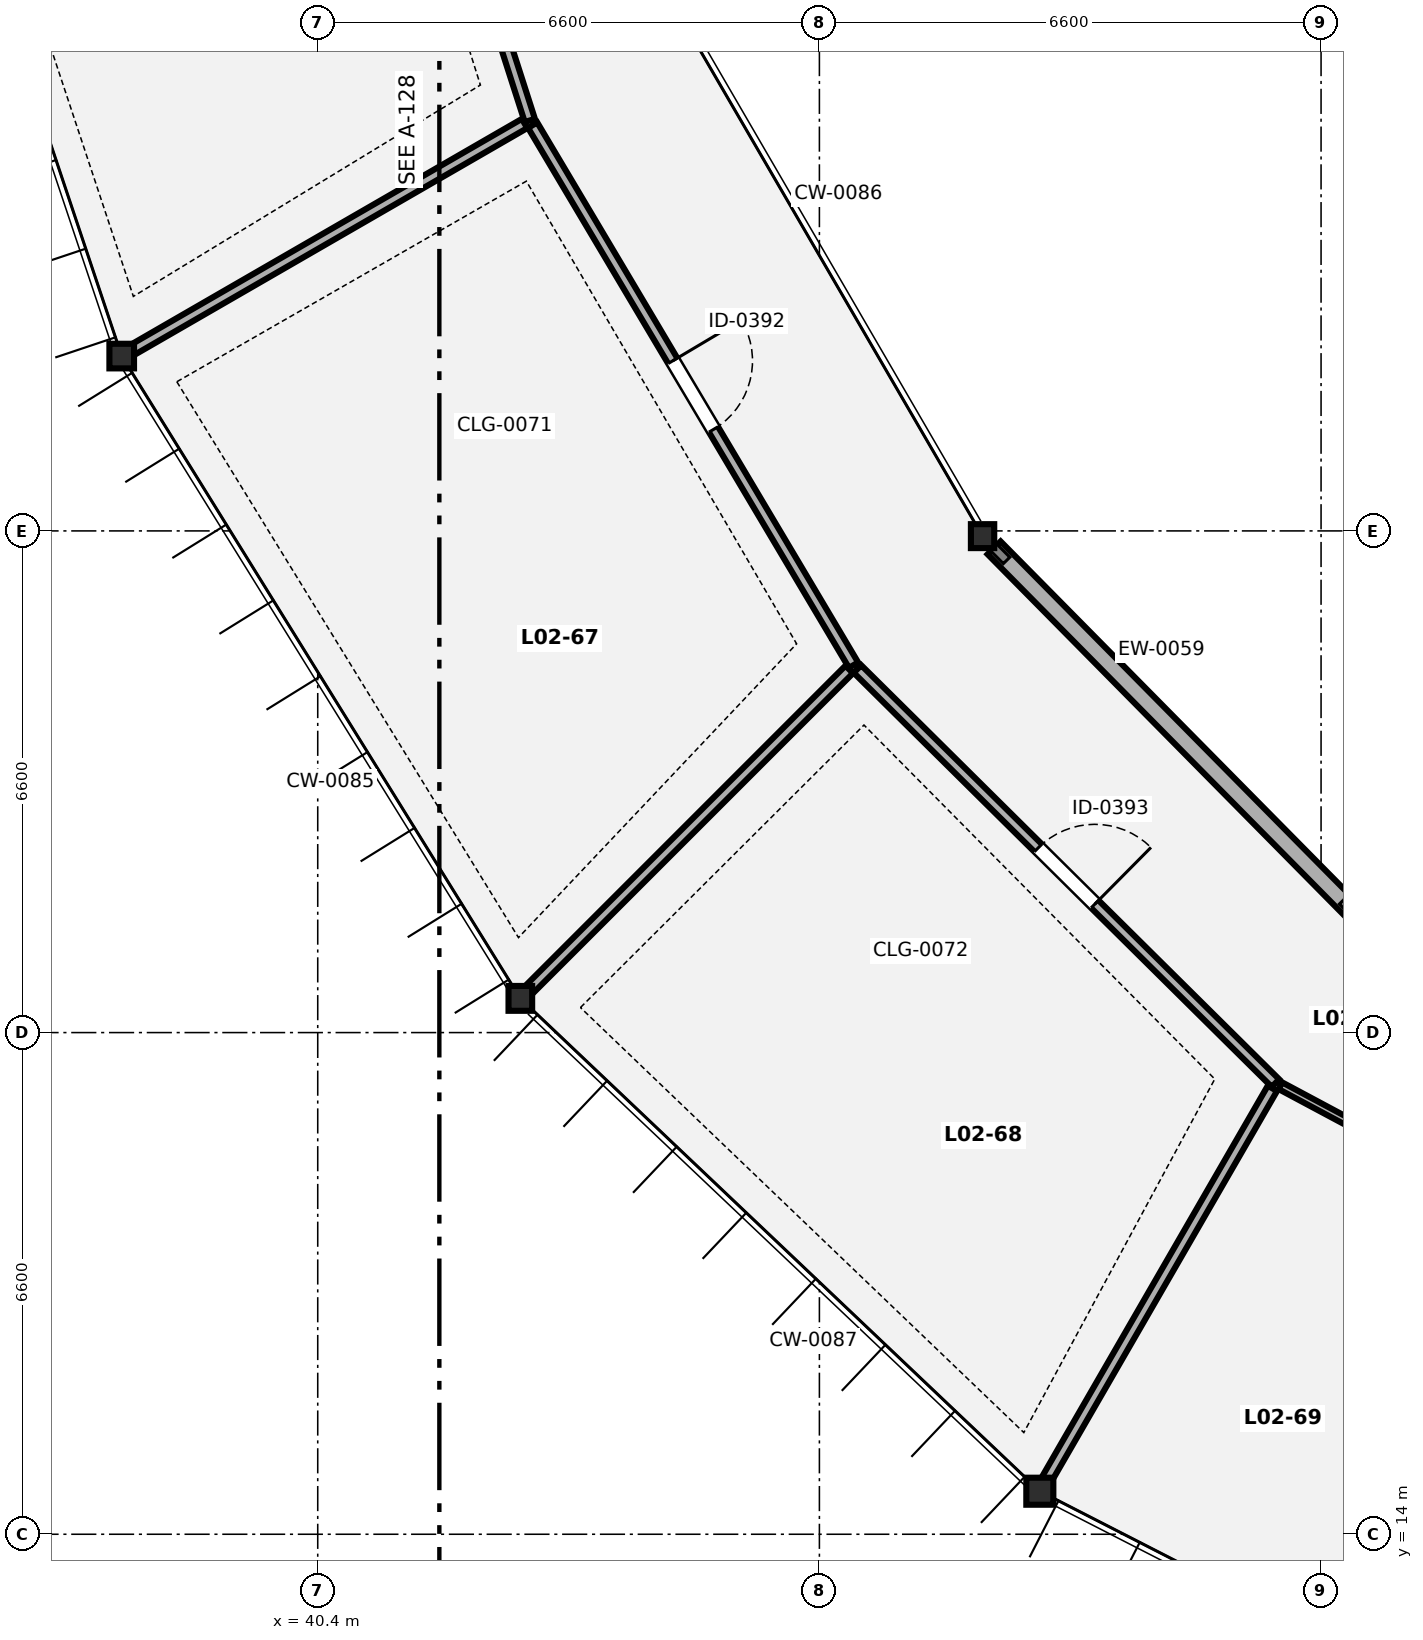
"""IFC4 building model, lengths in metres.
Left out: names, types, materials, properties, quantities, classifications, styles, units other than length and angle.
Written with IfcOpenShell. Run it as: python <this file> out.ifc"""

import sys

from ifc_helpers import new_model, si_unit, direction, frame, frame_2d, origin, origin_2d, place, context, subcontext, project, spatial, rectangle, hollow_circle, i_section, extrude, element, fill, save


model = new_model("IFC4")
c1 = context("Model", 3, precision=1e-05, world=origin(), true_north=direction((0.0, 1.0)))
c2 = subcontext(c1, "Body", "Model", "MODEL_VIEW")
j1 = project(units=[si_unit("LENGTHUNIT", "METRE"), si_unit("PLANEANGLEUNIT", "RADIAN")], contexts=[c1])
p1 = place(None, origin())
s1 = spatial("IfcSite", under=j1, at=p1, CompositionType="ELEMENT")
p2 = place(p1, origin())
s2 = spatial("IfcBuilding", under=s1, at=p2, CompositionType="ELEMENT")
p3 = place(p2, frame((0.0, 0.0, 9.1)))
s3 = spatial("IfcBuildingStorey", under=s2, at=p3, CompositionType="ELEMENT", Elevation=9.1)
p4 = place(p3, frame((37.821, 29.5, 0.0), z_axis=(0.0, 0.0, 1.0), x_axis=(1.0, 0.0, 0.0)))
e1 = element("IfcColumn", 1, at=p4, inside=s3, PredefinedType="COLUMN", context=c2, shape_type="SweptSolid", body=[
    extrude(hollow_circle(Radius=0.162, WallThickness=0.013, at=origin_2d()), origin(), (0.0, 0.0, 1.0), 4.2),
])
p5 = place(p3, frame((43.065, 21.05, 0.0), z_axis=(0.0, 0.0, 1.0), x_axis=(1.0, 0.0, 0.0)))
e2 = element("IfcColumn", 2, at=p5, inside=s3, PredefinedType="COLUMN", context=c2, shape_type="SweptSolid", body=[
    extrude(i_section(OverallWidth=0.311, OverallDepth=0.327, WebThickness=0.016, FlangeThickness=0.025, FilletRadius=0.017, at=origin_2d()), origin(), (0.0, 0.0, 1.0), 4.2),
])
p6 = place(p3, frame((49.146, 27.131, 0.0), z_axis=(0.0, 0.0, 1.0), x_axis=(1.0, 0.0, 0.0)))
e3 = element("IfcColumn", 3, at=p6, inside=s3, PredefinedType="COLUMN", context=c2, shape_type="SweptSolid", body=[
    extrude(i_section(OverallWidth=0.307, OverallDepth=0.315, WebThickness=0.012, FlangeThickness=0.019, FilletRadius=0.017, at=origin_2d()), origin(), (0.0, 0.0, 1.0), 4.2),
])
p7 = place(p3, frame((49.9, 14.566, 0.0), z_axis=(0.0, 0.0, 1.0), x_axis=(1.0, 0.0, 0.0)))
e4 = element("IfcColumn", 4, at=p7, inside=s3, PredefinedType="COLUMN", context=c2, shape_type="SweptSolid", body=[
    extrude(hollow_circle(Radius=0.178, WallThickness=0.013, at=origin_2d()), origin(), (0.0, 0.0, 1.0), 4.2),
])
p8 = place(p3, frame((49.299, 26.977, 0.0), z_axis=(0.0, 0.0, 1.0), x_axis=(0.702651385176, -0.711534279505, 0.0)))
e5 = element("IfcWall", 5, at=p8, inside=s3, PredefinedType="SOLIDWALL", context=c2, shape_type="SweptSolid", body=[
    extrude(rectangle(XDim=6.761, YDim=0.24, at=frame_2d((3.381, 0.0))), origin(), (0.0, 0.0, 1.0), 3.65),
])
p9 = place(p3, frame((40.513, 40.945, 0.0), z_axis=(0.0, 0.0, 1.0), x_axis=(0.305493323507, -0.952194218263, 0.0)))
e6 = element("IfcWall", 6, at=p9, inside=s3, PredefinedType="PARTITIONING", context=c2, shape_type="SweptSolid", body=[
    extrude(rectangle(XDim=8.764, YDim=0.14, at=frame_2d((4.382, 0.0))), origin(), (0.0, 0.0, 1.0), 4.0),
])
p10 = place(p9, frame((3.857, 0.0, 0.0)))
e7 = element("IfcOpeningElement", 7, at=p10, cuts=e6, PredefinedType="OPENING", context=c2, shape_type="SweptSolid", body=[
    extrude(rectangle(XDim=1.05, YDim=2.15, at=frame_2d((0.525, 1.075))), frame((0.0, 0.08, 0.0), z_axis=(0.0, -1.0, 0.0), x_axis=(1.0, 0.0, 0.0)), (0.0, 0.0, 1.0), 0.16),
])
p11 = place(p3, frame((43.121, 32.56, 0.0), z_axis=(0.0, 0.0, 1.0), x_axis=(-0.866010470582, -0.500025864173, 0.0)))
e8 = element("IfcWall", 8, at=p11, inside=s3, PredefinedType="PARTITIONING", context=c2, shape_type="SweptSolid", body=[
    extrude(rectangle(XDim=6.06, YDim=0.14, at=frame_2d((3.03, 0.0))), origin(), (0.0, 0.0, 1.0), 3.392),
])
p12 = place(p3, frame((43.227, 32.538, 0.0), z_axis=(0.0, 0.0, 1.0), x_axis=(0.510911392115, -0.859633380812, 0.0)))
e9 = element("IfcWall", 9, at=p12, inside=s3, PredefinedType="PARTITIONING", context=c2, shape_type="SweptSolid", body=[
    extrude(rectangle(XDim=8.264, YDim=0.14, at=frame_2d((4.132, 0.0))), origin(), (0.0, 0.0, 1.0), 4.0),
])
p13 = place(p12, frame((3.607, 0.0, 0.0)))
e10 = element("IfcOpeningElement", 10, at=p13, cuts=e9, PredefinedType="OPENING", context=c2, shape_type="SweptSolid", body=[
    extrude(rectangle(XDim=1.05, YDim=2.15, at=frame_2d((0.525, 1.075))), frame((0.0, 0.08, 0.0), z_axis=(0.0, -1.0, 0.0), x_axis=(1.0, 0.0, 0.0)), (0.0, 0.0, 1.0), 0.16),
])
p14 = place(p3, frame((47.393, 25.377, 0.0), z_axis=(0.0, 0.0, 1.0), x_axis=(-0.707086637129, -0.70712692467, 0.0)))
e11 = element("IfcWall", 11, at=p14, inside=s3, PredefinedType="PARTITIONING", context=c2, shape_type="SweptSolid", body=[
    extrude(rectangle(XDim=6.06, YDim=0.14, at=frame_2d((3.03, 0.0))), origin(), (0.0, 0.0, 1.0), 3.392),
])
p15 = place(p3, frame((47.501, 25.383, 0.0), z_axis=(0.0, 0.0, 1.0), x_axis=(0.71042636545, -0.703771539119, 0.0)))
e12 = element("IfcWall", 12, at=p15, inside=s3, PredefinedType="PARTITIONING", context=c2, shape_type="SweptSolid", body=[
    extrude(rectangle(XDim=7.741, YDim=0.14, at=frame_2d((3.87, 0.0))), origin(), (0.0, 0.0, 1.0), 4.0),
])
p16 = place(p15, frame((3.345, 0.0, 0.0)))
e13 = element("IfcOpeningElement", 13, at=p16, cuts=e12, PredefinedType="OPENING", context=c2, shape_type="SweptSolid", body=[
    extrude(rectangle(XDim=1.05, YDim=2.15, at=frame_2d((0.525, 1.075))), frame((0.0, 0.08, 0.0), z_axis=(0.0, -1.0, 0.0), x_axis=(1.0, 0.0, 0.0)), (0.0, 0.0, 1.0), 0.16),
])
p17 = place(p3, frame((52.96, 19.866, 0.0), z_axis=(0.0, 0.0, 1.0), x_axis=(-0.500008418462, -0.866020543329, 0.0)))
e14 = element("IfcWall", 14, at=p17, inside=s3, PredefinedType="PARTITIONING", context=c2, shape_type="SweptSolid", body=[
    extrude(rectangle(XDim=6.06, YDim=0.14, at=frame_2d((3.03, 0.0))), origin(), (0.0, 0.0, 1.0), 3.313),
])
p18 = place(p3, frame((53.063, 19.902, 0.0), z_axis=(0.0, 0.0, 1.0), x_axis=(0.881826283139, -0.471574391125, 0.0)))
e15 = element("IfcWall", 15, at=p18, inside=s3, PredefinedType="PARTITIONING", context=c2, shape_type="SweptSolid", body=[
    extrude(rectangle(XDim=7.258, YDim=0.1, at=frame_2d((3.629, 0.0))), origin(), (0.0, 0.0, 1.0), 4.0),
])
p19 = place(p18, frame((3.129, 0.0, 0.0)))
e16 = element("IfcOpeningElement", 16, at=p19, cuts=e15, PredefinedType="OPENING", context=c2, shape_type="SweptSolid", body=[
    extrude(rectangle(XDim=1.0, YDim=2.1, at=frame_2d((0.5, 1.05))), frame((0.0, 0.06, 0.0), z_axis=(0.0, -1.0, 0.0), x_axis=(1.0, 0.0, 0.0)), (0.0, 0.0, 1.0), 0.12),
])
p20 = place(p13, origin())
e17 = element("IfcDoor", 17, at=p20, inside=s3, OperationType="SINGLE_SWING_LEFT", PredefinedType="DOOR", context=c2, shape_type="SweptSolid", body=[
    extrude(rectangle(XDim=1.05, YDim=2.15, at=frame_2d((0.525, 1.075))), frame((0.0, 0.025, 0.0), z_axis=(0.0, -1.0, 0.0), x_axis=(1.0, 0.0, 0.0)), (0.0, 0.0, 1.0), 0.05),
])
fill(e10, e17)
p21 = place(p16, origin())
e18 = element("IfcDoor", 18, at=p21, inside=s3, OperationType="SINGLE_SWING_RIGHT", PredefinedType="DOOR", context=c2, shape_type="SweptSolid", body=[
    extrude(rectangle(XDim=1.05, YDim=2.15, at=frame_2d((0.525, 1.075))), frame((0.0, 0.025, 0.0), z_axis=(0.0, -1.0, 0.0), x_axis=(1.0, 0.0, 0.0)), (0.0, 0.0, 1.0), 0.05),
])
fill(e13, e18)
save(model, sys.argv[1])
